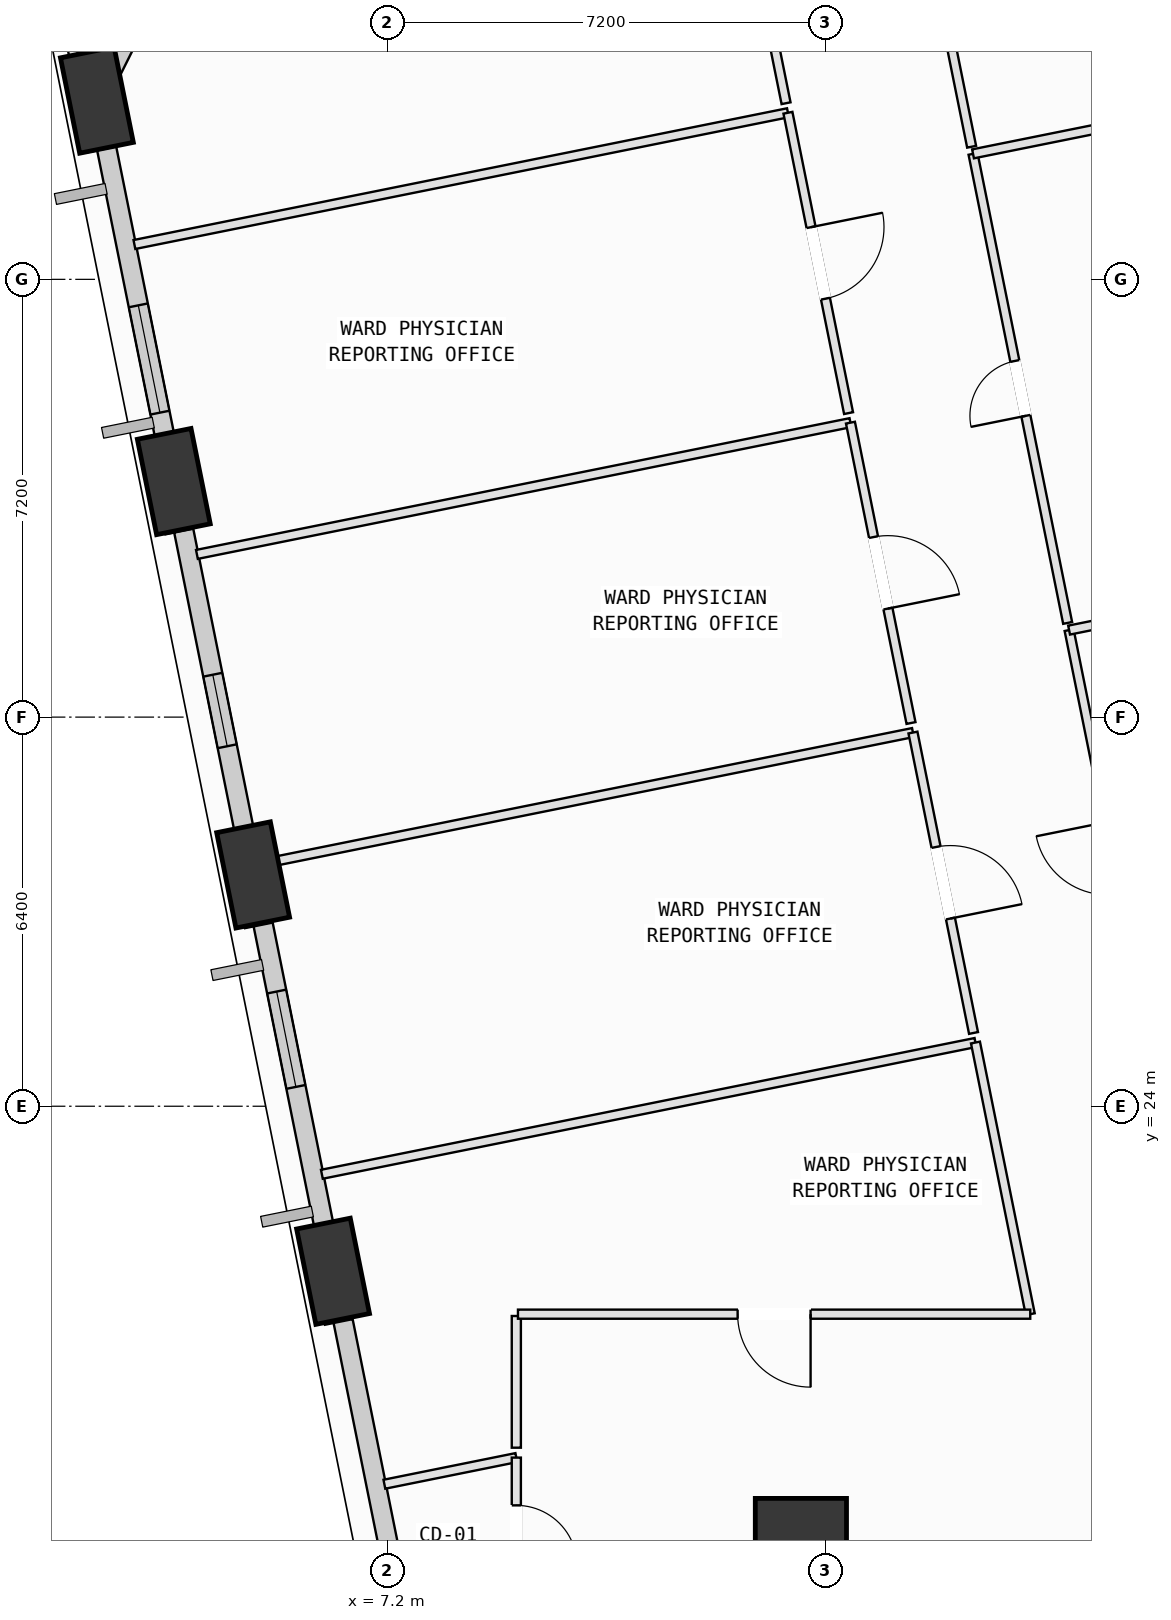
"""IFC4 building model, lengths in metres.
Left out: names, types, materials, properties, quantities, classifications, styles, units other than length and angle.
Written with IfcOpenShell. Run it as: python <this file> out.ifc"""

import sys

from ifc_helpers import new_model, si_unit, direction, frame, frame_2d, origin, origin_2d, place, context, subcontext, project, spatial, rectangle, extrude, element, fill, save


model = new_model("IFC4")
c1 = context("Model", 3, precision=1e-05, world=origin(), true_north=direction((0.0, 1.0)))
c2 = subcontext(c1, "Body", "Model", "MODEL_VIEW")
j1 = project(units=[si_unit("LENGTHUNIT", "METRE"), si_unit("PLANEANGLEUNIT", "RADIAN")], contexts=[c1])
p1 = place(None, origin())
s1 = spatial("IfcSite", under=j1, at=p1, CompositionType="ELEMENT")
p2 = place(p1, origin())
s2 = spatial("IfcBuilding", under=s1, at=p2, CompositionType="ELEMENT")
p3 = place(p2, frame((0.0, 0.0, 71.0)))
s3 = spatial("IfcBuildingStorey", under=s2, at=p3, CompositionType="ELEMENT", Elevation=71.0)
p4 = place(p3, frame((14.0, 16.8, 0.0), z_axis=(0.0, 0.0, 1.0), x_axis=(1.0, 0.0, 0.0)))
e1 = element("IfcColumn", 1, at=p4, inside=s3, PredefinedType="COLUMN", context=c2, shape_type="SweptSolid", body=[
    extrude(rectangle(XDim=1.5, YDim=1.5, at=origin_2d()), origin(), (0.0, 0.0, 1.0), 4.0),
])
p5 = place(p3, frame((2.422, 40.548, 0.002), z_axis=(-0.063540455362, -0.128410967829, 0.989683400828), x_axis=(0.253106021414, 0.957189910208, 0.140445070115)))
e2 = element("IfcColumn", 2, at=p5, inside=s3, PredefinedType="COLUMN", context=c2, shape_type="SweptSolid", body=[
    extrude(rectangle(XDim=1.6, YDim=0.9, at=origin_2d()), origin(), (0.0, 0.0, 1.0), 4.038),
])
p6 = place(p3, frame((3.687, 34.274, 0.002), z_axis=(-0.037921290688, -0.123274483305, 0.991647809194), x_axis=(0.096891160508, 0.987232175824, 0.126430747971)))
e3 = element("IfcColumn", 3, at=p6, inside=s3, PredefinedType="COLUMN", context=c2, shape_type="SweptSolid", body=[
    extrude(rectangle(XDim=1.6, YDim=0.9, at=origin_2d()), origin(), (0.0, 0.0, 1.0), 4.03),
])
p7 = place(p3, frame((4.992, 27.804, 0.002), z_axis=(-0.011403629937, -0.117857728549, 0.992965010988), x_axis=(-0.102994924349, 0.987886287452, 0.116072083735)))
e4 = element("IfcColumn", 4, at=p7, inside=s3, PredefinedType="COLUMN", context=c2, shape_type="SweptSolid", body=[
    extrude(rectangle(XDim=1.6, YDim=0.9, at=origin_2d()), origin(), (0.0, 0.0, 1.0), 4.025),
])
p8 = place(p3, frame((6.306, 21.286, 0.002), z_axis=(0.015416211566, -0.112283430694, 0.99355662728), x_axis=(-0.328298858698, 0.93801730998, 0.111100790078)))
e5 = element("IfcColumn", 5, at=p8, inside=s3, PredefinedType="COLUMN", context=c2, shape_type="SweptSolid", body=[
    extrude(rectangle(XDim=1.6, YDim=0.9, at=origin_2d()), origin(), (0.0, 0.0, 1.0), 4.022),
])
p9 = place(p3, frame((2.564, 40.833, 0.0), z_axis=(0.0, 0.0, 1.0), x_axis=(0.446654108226, 0.894706715972, 0.0)))
e6 = element("IfcWall", 6, at=p9, inside=s3, PredefinedType="SOLIDWALL", context=c2, shape_type="SweptSolid", body=[
    extrude(rectangle(XDim=3.666, YDim=0.32, at=frame_2d((1.833, 0.0))), origin(), (0.0, 0.0, 1.0), 3.165),
])
p10 = place(p3, frame((3.615, 34.634, 0.0), z_axis=(0.0, 0.0, 1.0), x_axis=(-0.197635090988, 0.980275660623, 0.0)))
e7 = element("IfcWall", 7, at=p10, inside=s3, PredefinedType="SOLIDWALL", context=c2, shape_type="SweptSolid", body=[
    extrude(rectangle(XDim=5.223, YDim=0.32, at=frame_2d((2.611, 0.0))), origin(), (0.0, 0.0, 1.0), 3.165),
])
p11 = place(p10, frame((0.79, 0.0, 0.75)))
e8 = element("IfcOpeningElement", 8, at=p11, cuts=e7, PredefinedType="OPENING", context=c2, shape_type="SweptSolid", body=[
    extrude(rectangle(XDim=1.8, YDim=2.05, at=frame_2d((0.9, 1.025))), frame((0.0, 0.17, 0.0), z_axis=(0.0, -1.0, 0.0), x_axis=(1.0, 0.0, 0.0)), (0.0, 0.0, 1.0), 0.34),
])
p12 = place(p3, frame((4.917, 28.173, 0.0), z_axis=(0.0, 0.0, 1.0), x_axis=(-0.197645987071, 0.980273463782, 0.0)))
e9 = element("IfcWall", 9, at=p12, inside=s3, PredefinedType="SOLIDWALL", context=c2, shape_type="SweptSolid", body=[
    extrude(rectangle(XDim=5.4, YDim=0.32, at=frame_2d((2.7, 0.0))), origin(), (0.0, 0.0, 1.0), 3.165),
])
p13 = place(p12, frame((1.783, 0.0, 0.75)))
e10 = element("IfcOpeningElement", 10, at=p13, cuts=e9, PredefinedType="OPENING", context=c2, shape_type="SweptSolid", body=[
    extrude(rectangle(XDim=1.2, YDim=1.75, at=frame_2d((0.6, 0.875))), frame((0.0, 0.17, 0.0), z_axis=(0.0, -1.0, 0.0), x_axis=(1.0, 0.0, 0.0)), (0.0, 0.0, 1.0), 0.34),
])
p14 = place(p3, frame((6.231, 21.658, 0.0), z_axis=(0.0, 0.0, 1.0), x_axis=(-0.19763548187, 0.980275581817, 0.0)))
e11 = element("IfcWall", 11, at=p14, inside=s3, PredefinedType="SOLIDWALL", context=c2, shape_type="SweptSolid", body=[
    extrude(rectangle(XDim=5.438, YDim=0.32, at=frame_2d((2.719, 0.0))), origin(), (0.0, 0.0, 1.0), 3.165),
])
p15 = place(p14, frame((2.713, 0.0, 0.75)))
e12 = element("IfcOpeningElement", 12, at=p15, cuts=e11, PredefinedType="OPENING", context=c2, shape_type="SweptSolid", body=[
    extrude(rectangle(XDim=1.6, YDim=1.95, at=frame_2d((0.8, 0.975))), frame((0.0, 0.17, 0.0), z_axis=(0.0, -1.0, 0.0), x_axis=(1.0, 0.0, 0.0)), (0.0, 0.0, 1.0), 0.34),
])
p16 = place(p3, frame((7.882, 13.471, 0.0), z_axis=(0.0, 0.0, 1.0), x_axis=(-0.197675150803, 0.980267583242, 0.0)))
e13 = element("IfcWall", 13, at=p16, inside=s3, PredefinedType="SOLIDWALL", context=c2, shape_type="SweptSolid", body=[
    extrude(rectangle(XDim=7.136, YDim=0.32, at=frame_2d((3.568, 0.0))), origin(), (0.0, 0.0, 1.0), 3.165),
])
p17 = place(p16, frame((1.081, 0.0, 0.75)))
e14 = element("IfcOpeningElement", 14, at=p17, cuts=e13, PredefinedType="OPENING", context=c2, shape_type="SweptSolid", body=[
    extrude(rectangle(XDim=2.0, YDim=1.95, at=frame_2d((1.0, 0.975))), frame((0.0, 0.17, 0.0), z_axis=(0.0, -1.0, 0.0), x_axis=(1.0, 0.0, 0.0)), (0.0, 0.0, 1.0), 0.34),
])
p18 = place(p3, frame((7.15, 17.783, 0.0), z_axis=(0.0, 0.0, 1.0), x_axis=(0.980235621704, 0.197833581431, 0.0)))
e15 = element("IfcWall", 15, at=p18, inside=s3, PredefinedType="PARTITIONING", context=c2, shape_type="SweptSolid", body=[
    extrude(rectangle(XDim=2.214, YDim=0.15, at=frame_2d((1.107, 0.0))), origin(), (0.0, 0.0, 1.0), 3.78),
])
p19 = place(p3, frame((9.32, 18.221, 0.0), z_axis=(0.0, 0.0, 1.0), x_axis=(0.0, -1.0, 0.0)))
e16 = element("IfcWall", 16, at=p19, inside=s3, PredefinedType="PARTITIONING", context=c2, shape_type="SweptSolid", body=[
    extrude(rectangle(XDim=2.571, YDim=0.15, at=frame_2d((1.286, 0.0))), origin(), (0.0, 0.0, 1.0), 3.78),
])
p20 = place(p19, frame((0.785, 0.0, 0.0)))
e17 = element("IfcOpeningElement", 17, at=p20, cuts=e16, PredefinedType="OPENING", context=c2, shape_type="SweptSolid", body=[
    extrude(rectangle(XDim=1.0, YDim=2.12, at=frame_2d((0.5, 1.06))), frame((0.0, 0.085, 0.0), z_axis=(0.0, -1.0, 0.0), x_axis=(1.0, 0.0, 0.0)), (0.0, 0.0, 1.0), 0.17),
])
p21 = place(p3, frame((9.32, 20.55, 0.0), z_axis=(0.0, 0.0, 1.0), x_axis=(0.0, -1.0, 0.0)))
e18 = element("IfcWall", 18, at=p21, inside=s3, PredefinedType="PARTITIONING", context=c2, shape_type="SweptSolid", body=[
    extrude(rectangle(XDim=2.166, YDim=0.15, at=frame_2d((1.083, 0.0))), origin(), (0.0, 0.0, 1.0), 3.78),
])
p22 = place(p3, frame((6.246, 20.421, 0.0), z_axis=(0.0, 0.0, 1.0), x_axis=(-0.198315891718, 0.980138157145, 0.0)))
e19 = element("IfcWall", 19, at=p22, inside=s3, PredefinedType="PARTITIONING", context=c2, shape_type="SweptSolid", body=[
    extrude(rectangle(XDim=1.216, YDim=0.15, at=frame_2d((0.608, 0.0))), origin(), (0.0, 0.0, 1.0), 3.165),
])
p23 = place(p3, frame((6.122, 22.881, 0.0), z_axis=(0.0, 0.0, 1.0), x_axis=(0.980278085225, 0.197623064515, 0.0)))
e20 = element("IfcWall", 20, at=p23, inside=s3, PredefinedType="PARTITIONING", context=c2, shape_type="SweptSolid", body=[
    extrude(rectangle(XDim=10.965, YDim=0.15, at=frame_2d((5.483, 0.0))), origin(), (0.0, 0.0, 1.0), 3.78),
])
p24 = place(p3, frame((16.871, 25.048, 0.0), z_axis=(0.0, 0.0, 1.0), x_axis=(0.197650705998, -0.980272512324, 0.0)))
e21 = element("IfcWall", 21, at=p24, inside=s3, PredefinedType="PARTITIONING", context=c2, shape_type="SweptSolid", body=[
    extrude(rectangle(XDim=4.558, YDim=0.15, at=frame_2d((2.279, 0.0))), origin(), (0.0, 0.0, 1.0), 3.78),
])
p25 = place(p3, frame((17.772, 20.58, 0.0), z_axis=(0.0, 0.0, 1.0), x_axis=(-1.0, 0.0, 0.0)))
e22 = element("IfcWall", 22, at=p25, inside=s3, PredefinedType="PARTITIONING", context=c2, shape_type="SweptSolid", body=[
    extrude(rectangle(XDim=8.425, YDim=0.15, at=frame_2d((4.212, 0.0))), origin(), (0.0, 0.0, 1.0), 3.78),
])
p26 = place(p25, frame((3.613, 0.0, 0.0)))
e23 = element("IfcOpeningElement", 23, at=p26, cuts=e22, PredefinedType="OPENING", context=c2, shape_type="SweptSolid", body=[
    extrude(rectangle(XDim=1.2, YDim=2.15, at=frame_2d((0.6, 1.075))), frame((0.0, 0.085, 0.0), z_axis=(0.0, -1.0, 0.0), x_axis=(1.0, 0.0, 0.0)), (0.0, 0.0, 1.0), 0.17),
])
p27 = place(p3, frame((4.737, 27.906, 0.0), z_axis=(0.0, 0.0, 1.0), x_axis=(0.980260288007, 0.197711324301, 0.0)))
e24 = element("IfcWall", 24, at=p27, inside=s3, PredefinedType="PARTITIONING", context=c2, shape_type="SweptSolid", body=[
    extrude(rectangle(XDim=11.33, YDim=0.15, at=frame_2d((5.665, 0.0))), origin(), (0.0, 0.0, 1.0), 3.78),
])
p28 = place(p3, frame((15.843, 30.146, 0.0), z_axis=(0.0, 0.0, 1.0), x_axis=(0.197624916703, -0.980277711824, 0.0)))
e25 = element("IfcWall", 25, at=p28, inside=s3, PredefinedType="PARTITIONING", context=c2, shape_type="SweptSolid", body=[
    extrude(rectangle(XDim=5.04, YDim=0.15, at=frame_2d((2.52, 0.0))), origin(), (0.0, 0.0, 1.0), 3.78),
])
p29 = place(p28, frame((1.92, 0.0, 0.0)))
e26 = element("IfcOpeningElement", 26, at=p29, cuts=e25, PredefinedType="OPENING", context=c2, shape_type="SweptSolid", body=[
    extrude(rectangle(XDim=1.2, YDim=2.15, at=frame_2d((0.6, 1.075))), frame((0.0, 0.085, 0.0), z_axis=(0.0, -1.0, 0.0), x_axis=(1.0, 0.0, 0.0)), (0.0, 0.0, 1.0), 0.17),
])
p30 = place(p3, frame((4.931, 26.944, 0.0), z_axis=(0.0, 0.0, 1.0), x_axis=(-0.197551339711, 0.980292542142, 0.0)))
e27 = element("IfcWall", 27, at=p30, inside=s3, PredefinedType="PARTITIONING", context=c2, shape_type="SweptSolid", body=[
    extrude(rectangle(XDim=0.981, YDim=0.15, at=frame_2d((0.491, 0.0))), origin(), (0.0, 0.0, 1.0), 3.165),
])
p31 = place(p3, frame((4.067, 33.076, 0.0), z_axis=(0.0, 0.0, 1.0), x_axis=(0.980274606561, 0.197640319095, 0.0)))
e28 = element("IfcWall", 28, at=p31, inside=s3, PredefinedType="PARTITIONING", context=c2, shape_type="SweptSolid", body=[
    extrude(rectangle(XDim=10.964, YDim=0.15, at=frame_2d((5.482, 0.0))), origin(), (0.0, 0.0, 1.0), 3.78),
])
p32 = place(p3, frame((14.815, 35.243, 0.0), z_axis=(0.0, 0.0, 1.0), x_axis=(0.197662458337, -0.980270142646, 0.0)))
e29 = element("IfcWall", 29, at=p32, inside=s3, PredefinedType="PARTITIONING", context=c2, shape_type="SweptSolid", body=[
    extrude(rectangle(XDim=5.039, YDim=0.15, at=frame_2d((2.52, 0.0))), origin(), (0.0, 0.0, 1.0), 3.78),
])
p33 = place(p32, frame((1.92, 0.0, 0.0)))
e30 = element("IfcOpeningElement", 30, at=p33, cuts=e29, PredefinedType="OPENING", context=c2, shape_type="SweptSolid", body=[
    extrude(rectangle(XDim=1.2, YDim=2.15, at=frame_2d((0.6, 1.075))), frame((0.0, 0.085, 0.0), z_axis=(0.0, -1.0, 0.0), x_axis=(1.0, 0.0, 0.0)), (0.0, 0.0, 1.0), 0.17),
])
p34 = place(p3, frame((3.039, 38.173, 0.0), z_axis=(0.0, 0.0, 1.0), x_axis=(0.980274606561, 0.197640319095, 0.0)))
e31 = element("IfcWall", 31, at=p34, inside=s3, PredefinedType="PARTITIONING", context=c2, shape_type="SweptSolid", body=[
    extrude(rectangle(XDim=10.964, YDim=0.15, at=frame_2d((5.482, 0.0))), origin(), (0.0, 0.0, 1.0), 3.78),
])
p35 = place(p3, frame((13.787, 40.34, 0.0), z_axis=(0.0, 0.0, 1.0), x_axis=(0.19779272105, -0.980243867361, 0.0)))
e32 = element("IfcWall", 32, at=p35, inside=s3, PredefinedType="PARTITIONING", context=c2, shape_type="SweptSolid", body=[
    extrude(rectangle(XDim=5.04, YDim=0.15, at=frame_2d((2.52, 0.0))), origin(), (0.0, 0.0, 1.0), 3.78),
])
p36 = place(p35, frame((1.92, 0.0, 0.0)))
e33 = element("IfcOpeningElement", 33, at=p36, cuts=e32, PredefinedType="OPENING", context=c2, shape_type="SweptSolid", body=[
    extrude(rectangle(XDim=1.2, YDim=2.15, at=frame_2d((0.6, 1.075))), frame((0.0, 0.085, 0.0), z_axis=(0.0, -1.0, 0.0), x_axis=(1.0, 0.0, 0.0)), (0.0, 0.0, 1.0), 0.17),
])
p37 = place(p3, frame((3.624, 33.421, 0.0), z_axis=(0.0, 0.0, 1.0), x_axis=(-0.197496316867, 0.980303628895, 0.0)))
e34 = element("IfcWall", 34, at=p37, inside=s3, PredefinedType="PARTITIONING", context=c2, shape_type="SweptSolid", body=[
    extrude(rectangle(XDim=1.19, YDim=0.15, at=frame_2d((0.595, 0.0))), origin(), (0.0, 0.0, 1.0), 3.165),
])
p38 = place(p3, frame((12.76, 45.438, 0.0), z_axis=(0.0, 0.0, 1.0), x_axis=(0.197624916703, -0.980277711824, 0.0)))
e35 = element("IfcWall", 35, at=p38, inside=s3, PredefinedType="PARTITIONING", context=c2, shape_type="SweptSolid", body=[
    extrude(rectangle(XDim=5.04, YDim=0.15, at=frame_2d((2.52, 0.0))), origin(), (0.0, 0.0, 1.0), 2.865),
])
p39 = place(p38, frame((1.92, 0.0, 0.0)))
e36 = element("IfcOpeningElement", 36, at=p39, cuts=e35, PredefinedType="OPENING", context=c2, shape_type="SweptSolid", body=[
    extrude(rectangle(XDim=1.2, YDim=2.15, at=frame_2d((0.6, 1.075))), frame((0.0, 0.085, 0.0), z_axis=(0.0, -1.0, 0.0), x_axis=(1.0, 0.0, 0.0)), (0.0, 0.0, 1.0), 0.17),
])
p40 = place(p3, frame((2.357, 39.708, 0.0), z_axis=(0.0, 0.0, 1.0), x_axis=(-0.197687528827, 0.980265087079, 0.0)))
e37 = element("IfcWall", 37, at=p40, inside=s3, PredefinedType="PARTITIONING", context=c2, shape_type="SweptSolid", body=[
    extrude(rectangle(XDim=2.211, YDim=0.15, at=frame_2d((1.105, 0.0))), origin(), (0.0, 0.0, 1.0), 3.165),
])
p41 = place(p3, frame((19.92, 24.347, 0.0), z_axis=(0.0, 0.0, 1.0), x_axis=(-0.197653276626, 0.980271994009, 0.0)))
e38 = element("IfcWall", 38, at=p41, inside=s3, PredefinedType="PARTITIONING", context=c2, shape_type="SweptSolid", body=[
    extrude(rectangle(XDim=7.635, YDim=0.15, at=frame_2d((3.817, 0.0))), origin(), (0.0, 0.0, 1.0), 3.78),
])
p42 = place(p41, frame((3.217, 0.0, 0.0)))
e39 = element("IfcOpeningElement", 39, at=p42, cuts=e38, PredefinedType="OPENING", context=c2, shape_type="SweptSolid", body=[
    extrude(rectangle(XDim=1.2, YDim=2.15, at=frame_2d((0.6, 1.075))), frame((0.0, 0.085, 0.0), z_axis=(0.0, -1.0, 0.0), x_axis=(1.0, 0.0, 0.0)), (0.0, 0.0, 1.0), 0.17),
])
p43 = place(p3, frame((18.411, 31.831, 0.0), z_axis=(0.0, 0.0, 1.0), x_axis=(0.980272194859, 0.1976522805, 0.0)))
e40 = element("IfcWall", 40, at=p43, inside=s3, PredefinedType="PARTITIONING", context=c2, shape_type="SweptSolid", body=[
    extrude(rectangle(XDim=6.815, YDim=0.15, at=frame_2d((3.407, 0.0))), origin(), (0.0, 0.0, 1.0), 3.78),
])
p44 = place(p3, frame((18.387, 31.949, 0.0), z_axis=(0.0, 0.0, 1.0), x_axis=(-0.197690746024, 0.98026443827, 0.0)))
e41 = element("IfcWall", 41, at=p44, inside=s3, PredefinedType="PARTITIONING", context=c2, shape_type="SweptSolid", body=[
    extrude(rectangle(XDim=7.87, YDim=0.15, at=frame_2d((3.935, 0.0))), origin(), (0.0, 0.0, 1.0), 3.78),
])
p45 = place(p44, frame((3.475, 0.0, 0.0)))
e42 = element("IfcOpeningElement", 42, at=p45, cuts=e41, PredefinedType="OPENING", context=c2, shape_type="SweptSolid", body=[
    extrude(rectangle(XDim=0.92, YDim=2.1, at=frame_2d((0.46, 1.05))), frame((0.0, 0.085, 0.0), z_axis=(0.0, -1.0, 0.0), x_axis=(1.0, 0.0, 0.0)), (0.0, 0.0, 1.0), 0.17),
])
p46 = place(p3, frame((16.831, 39.664, 0.0), z_axis=(0.0, 0.0, 1.0), x_axis=(0.980276392981, 0.197631458435, 0.0)))
e43 = element("IfcWall", 43, at=p46, inside=s3, PredefinedType="PARTITIONING", context=c2, shape_type="SweptSolid", body=[
    extrude(rectangle(XDim=6.815, YDim=0.15, at=frame_2d((3.408, 0.0))), origin(), (0.0, 0.0, 1.0), 3.78),
])
p47 = place(p3, frame((16.808, 39.781, 0.0), z_axis=(0.0, 0.0, 1.0), x_axis=(-0.197804914587, 0.980241406882, 0.0)))
e44 = element("IfcWall", 44, at=p47, inside=s3, PredefinedType="PARTITIONING", context=c2, shape_type="SweptSolid", body=[
    extrude(rectangle(XDim=7.311, YDim=0.15, at=frame_2d((3.655, 0.0))), origin(), (0.0, 0.0, 1.0), 3.78),
])
p48 = place(p47, frame((3.195, 0.0, 0.0)))
e45 = element("IfcOpeningElement", 45, at=p48, cuts=e44, PredefinedType="OPENING", context=c2, shape_type="SweptSolid", body=[
    extrude(rectangle(XDim=0.92, YDim=2.1, at=frame_2d((0.46, 1.05))), frame((0.0, 0.085, 0.0), z_axis=(0.0, -1.0, 0.0), x_axis=(1.0, 0.0, 0.0)), (0.0, 0.0, 1.0), 0.17),
])
p49 = place(p11, origin())
e46 = element("IfcWindow", 46, at=p49, inside=s3, PartitioningType="SINGLE_PANEL", PredefinedType="WINDOW", context=c2, shape_type="SweptSolid", body=[
    extrude(rectangle(XDim=1.8, YDim=2.05, at=frame_2d((0.9, 1.025))), frame((0.0, 0.03, 0.0), z_axis=(0.0, -1.0, 0.0), x_axis=(1.0, 0.0, 0.0)), (0.0, 0.0, 1.0), 0.06),
])
fill(e8, e46)
p50 = place(p13, origin())
e47 = element("IfcWindow", 47, at=p50, inside=s3, PartitioningType="SINGLE_PANEL", PredefinedType="WINDOW", context=c2, shape_type="SweptSolid", body=[
    extrude(rectangle(XDim=1.2, YDim=1.75, at=frame_2d((0.6, 0.875))), frame((0.0, 0.03, 0.0), z_axis=(0.0, -1.0, 0.0), x_axis=(1.0, 0.0, 0.0)), (0.0, 0.0, 1.0), 0.06),
])
fill(e10, e47)
p51 = place(p15, origin())
e48 = element("IfcWindow", 48, at=p51, inside=s3, PartitioningType="SINGLE_PANEL", PredefinedType="WINDOW", context=c2, shape_type="SweptSolid", body=[
    extrude(rectangle(XDim=1.6, YDim=1.95, at=frame_2d((0.8, 0.975))), frame((0.0, 0.03, 0.0), z_axis=(0.0, -1.0, 0.0), x_axis=(1.0, 0.0, 0.0)), (0.0, 0.0, 1.0), 0.06),
])
fill(e12, e48)
p52 = place(p20, origin())
e49 = element("IfcDoor", 49, at=p52, inside=s3, OperationType="SINGLE_SWING_RIGHT", PredefinedType="DOOR", context=c2, shape_type="SweptSolid", body=[
    extrude(rectangle(XDim=1.0, YDim=2.12, at=frame_2d((0.5, 1.06))), frame((0.0, 0.025, 0.0), z_axis=(0.0, -1.0, 0.0), x_axis=(1.0, 0.0, 0.0)), (0.0, 0.0, 1.0), 0.05),
])
fill(e17, e49)
p53 = place(p26, origin())
e50 = element("IfcDoor", 50, at=p53, inside=s3, OperationType="SINGLE_SWING_LEFT", PredefinedType="DOOR", context=c2, shape_type="SweptSolid", body=[
    extrude(rectangle(XDim=1.2, YDim=2.15, at=frame_2d((0.6, 1.075))), frame((0.0, 0.025, 0.0), z_axis=(0.0, -1.0, 0.0), x_axis=(1.0, 0.0, 0.0)), (0.0, 0.0, 1.0), 0.05),
])
fill(e23, e50)
p54 = place(p29, origin())
e51 = element("IfcDoor", 51, at=p54, inside=s3, OperationType="SINGLE_SWING_RIGHT", PredefinedType="DOOR", context=c2, shape_type="SweptSolid", body=[
    extrude(rectangle(XDim=1.2, YDim=2.15, at=frame_2d((0.6, 1.075))), frame((0.0, 0.025, 0.0), z_axis=(0.0, -1.0, 0.0), x_axis=(1.0, 0.0, 0.0)), (0.0, 0.0, 1.0), 0.05),
])
fill(e26, e51)
p55 = place(p33, origin())
e52 = element("IfcDoor", 52, at=p55, inside=s3, OperationType="SINGLE_SWING_RIGHT", PredefinedType="DOOR", context=c2, shape_type="SweptSolid", body=[
    extrude(rectangle(XDim=1.2, YDim=2.15, at=frame_2d((0.6, 1.075))), frame((0.0, 0.025, 0.0), z_axis=(0.0, -1.0, 0.0), x_axis=(1.0, 0.0, 0.0)), (0.0, 0.0, 1.0), 0.05),
])
fill(e30, e52)
p56 = place(p36, origin())
e53 = element("IfcDoor", 53, at=p56, inside=s3, OperationType="SINGLE_SWING_LEFT", PredefinedType="DOOR", context=c2, shape_type="SweptSolid", body=[
    extrude(rectangle(XDim=1.2, YDim=2.15, at=frame_2d((0.6, 1.075))), frame((0.0, 0.025, 0.0), z_axis=(0.0, -1.0, 0.0), x_axis=(1.0, 0.0, 0.0)), (0.0, 0.0, 1.0), 0.05),
])
fill(e33, e53)
p57 = place(p45, origin())
e54 = element("IfcDoor", 54, at=p57, inside=s3, OperationType="SINGLE_SWING_LEFT", PredefinedType="DOOR", context=c2, shape_type="SweptSolid", body=[
    extrude(rectangle(XDim=0.92, YDim=2.1, at=frame_2d((0.46, 1.05))), frame((0.0, 0.025, 0.0), z_axis=(0.0, -1.0, 0.0), x_axis=(1.0, 0.0, 0.0)), (0.0, 0.0, 1.0), 0.05),
])
fill(e42, e54)
save(model, sys.argv[1])
